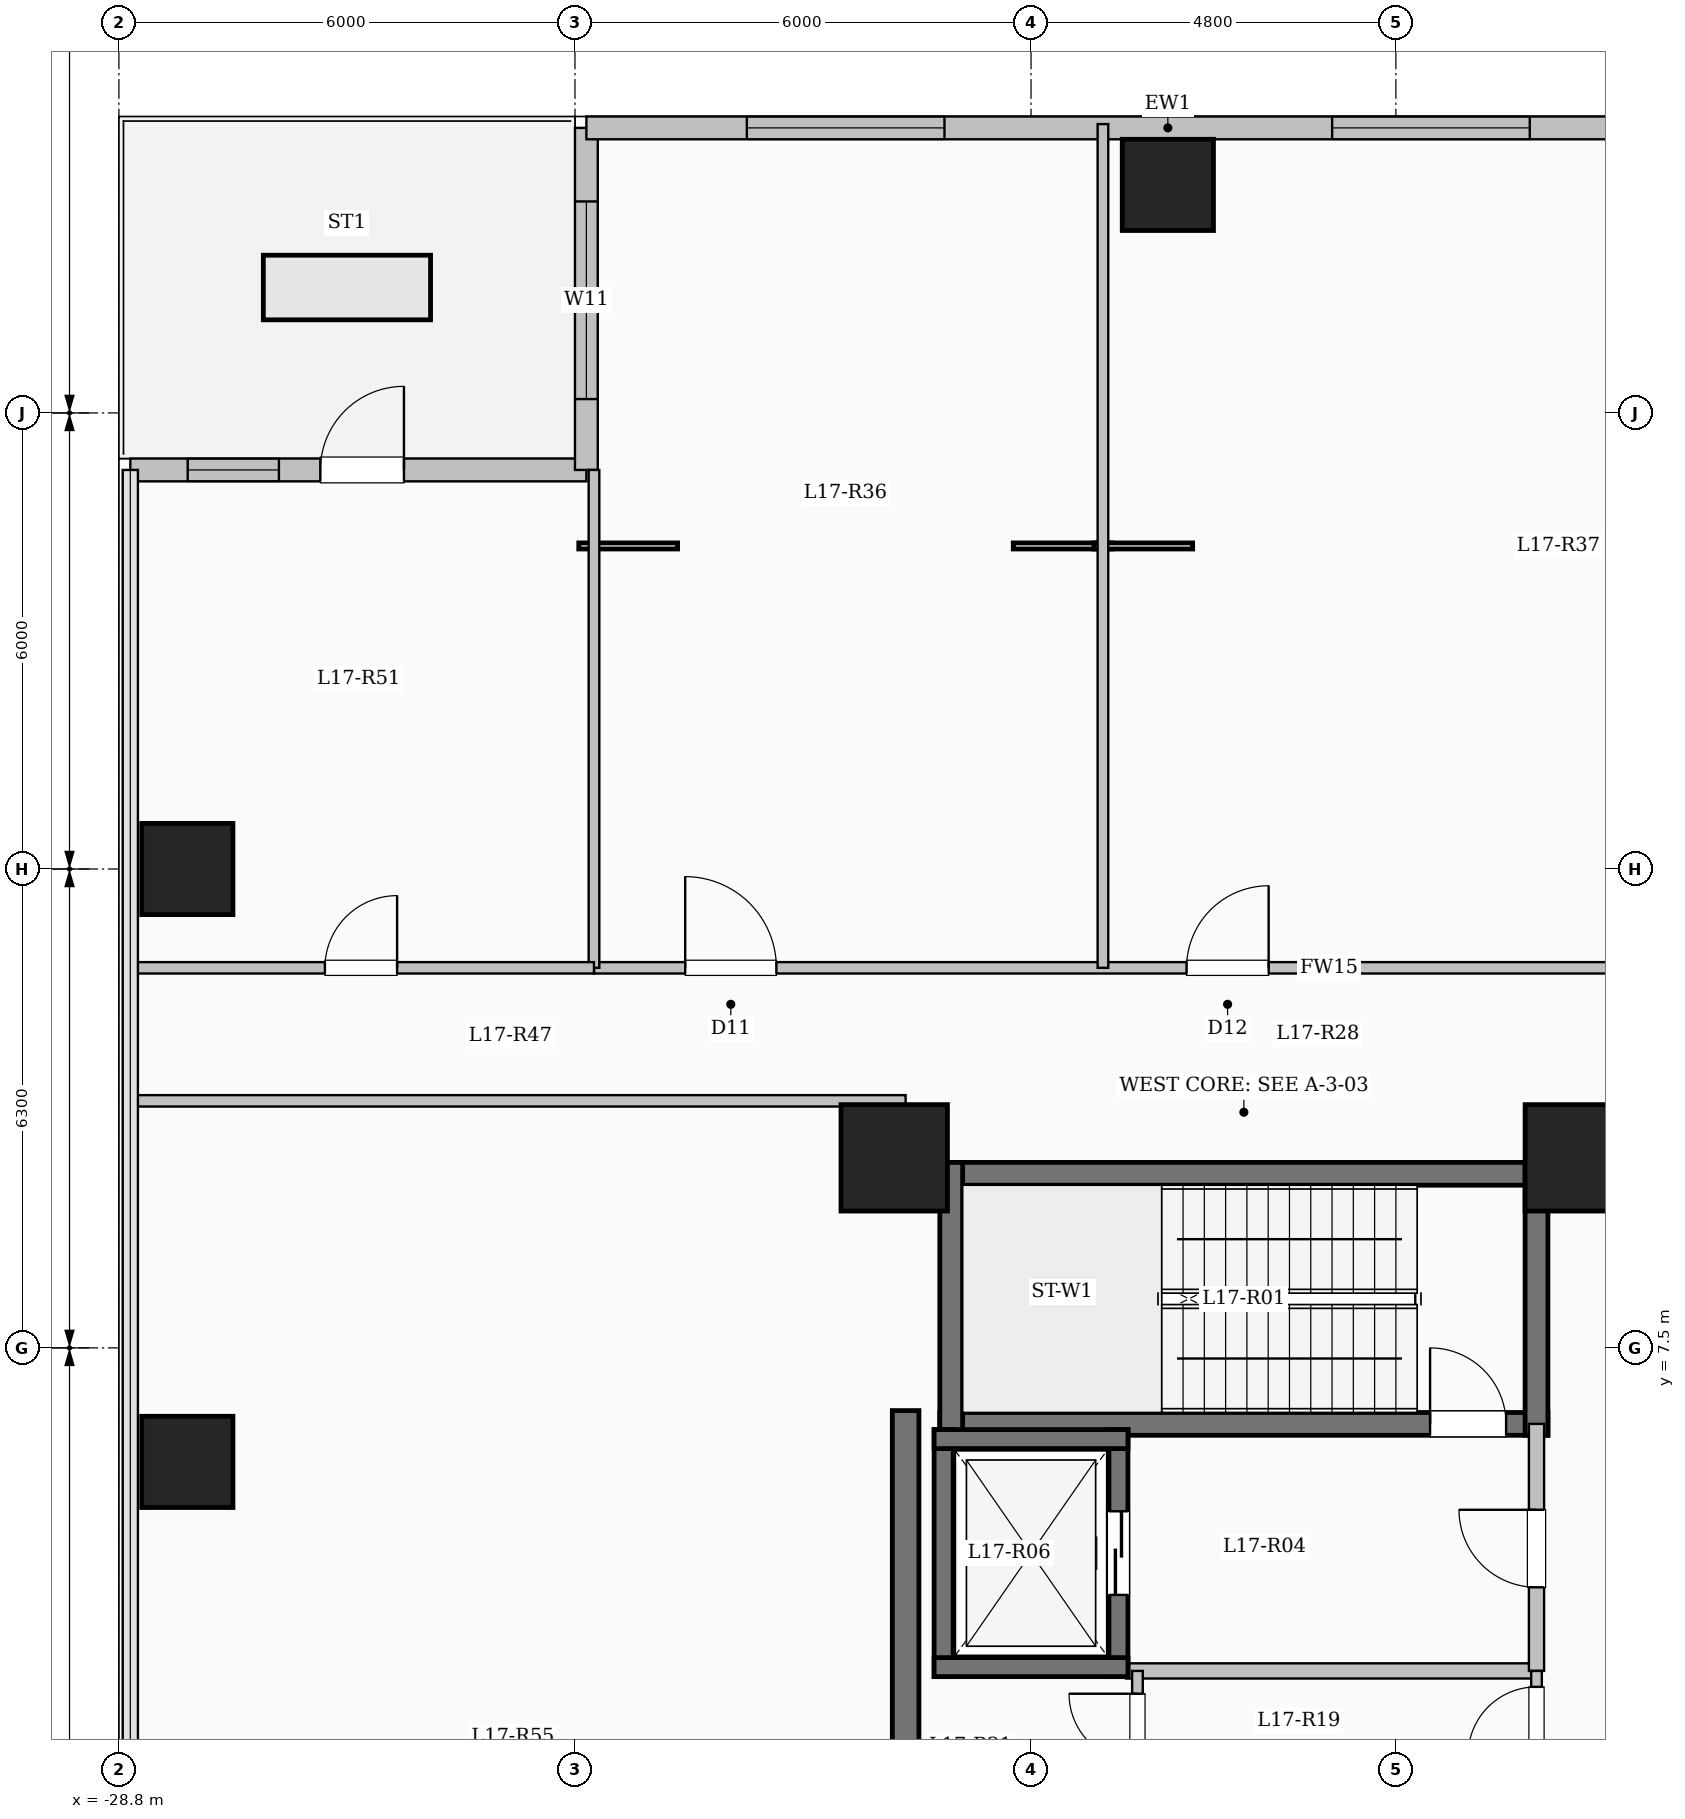
"""IFC4 building model, lengths in metres.
Left out: names, types, materials, properties, quantities, classifications, styles, units other than length and angle.
Written with IfcOpenShell. Run it as: python <this file> out.ifc"""

import sys

from ifc_helpers import new_model, si_unit, direction, frame, frame_2d, origin, origin_2d, place, context, subcontext, project, spatial, rectangle, extrude, element, fill, save


model = new_model("IFC4")
c1 = context("Model", 3, precision=1e-05, world=origin(), true_north=direction((0.0, 1.0)))
c2 = subcontext(c1, "Body", "Model", "MODEL_VIEW")
j1 = project(units=[si_unit("LENGTHUNIT", "METRE"), si_unit("PLANEANGLEUNIT", "RADIAN")], contexts=[c1])
p1 = place(None, origin())
s1 = spatial("IfcSite", under=j1, at=p1, CompositionType="ELEMENT")
p2 = place(p1, origin())
s2 = spatial("IfcBuilding", under=s1, at=p2, CompositionType="ELEMENT")
p3 = place(p2, frame((0.0, 0.0, 64.2)))
s3 = spatial("IfcBuildingStorey", under=s2, at=p3, CompositionType="ELEMENT", Elevation=64.2)
for number, where, z_axis, x_axis in (
    (1, (-9.6, 10.0, 0.0), (0.0, 0.0, 1.0), (1.0, 0.0, 0.0)),
    (2, (-18.6, 10.0, 0.0), (0.0, 0.0, 1.0), (1.0, 0.0, 0.0)),
):
    element("IfcColumn", number, at=place(p3, frame(where, z_axis=z_axis, x_axis=x_axis)), inside=s3, PredefinedType="COLUMN", context=c2, shape_type="SweptSolid", body=[
        extrude(rectangle(XDim=1.4, YDim=1.4, at=origin_2d()), origin(), (0.0, 0.0, 1.0), 4.5),
    ])
for number, where, z_axis, x_axis in (
    (3, (-15.0, 22.8, 0.0), (0.0, 0.0, 1.0), (1.0, 0.0, 0.0)),
    (4, (-27.9, 6.0, 0.0), (0.0, 0.0, 1.0), (1.0, 0.0, 0.0)),
    (5, (-27.9, 13.8, 0.0), (0.0, 0.0, 1.0), (1.0, 0.0, 0.0)),
):
    element("IfcColumn", number, at=place(p3, frame(where, z_axis=z_axis, x_axis=x_axis)), inside=s3, PredefinedType="COLUMN", context=c2, shape_type="SweptSolid", body=[
        extrude(rectangle(XDim=1.2, YDim=1.2, at=origin_2d()), origin(), (0.0, 0.0, 1.0), 4.5),
    ])
p4 = place(p3, frame((-28.65, 19.05, 0.0), z_axis=(0.0, 0.0, 1.0), x_axis=(1.0, 0.0, 0.0)))
e6 = element("IfcWall", 6, at=p4, inside=s3, PredefinedType="SOLIDWALL", context=c2, shape_type="SweptSolid", body=[
    extrude(rectangle(XDim=6.0, YDim=0.3, at=frame_2d((3.0, 0.0))), origin(), (0.0, 0.0, 1.0), 4.2),
])
p5 = place(p4, frame((2.5, 0.0, 0.0)))
e7 = element("IfcOpeningElement", 7, at=p5, cuts=e6, PredefinedType="OPENING", context=c2, shape_type="SweptSolid", body=[
    extrude(rectangle(XDim=1.1, YDim=2.2, at=frame_2d((0.55, 1.1))), frame((0.0, 0.16, 0.0), z_axis=(0.0, -1.0, 0.0), x_axis=(1.0, 0.0, 0.0)), (0.0, 0.0, 1.0), 0.32),
])
p6 = place(p4, frame((0.755, 0.0, 0.95)))
e8 = element("IfcOpeningElement", 8, at=p6, cuts=e6, PredefinedType="OPENING", context=c2, shape_type="SweptSolid", body=[
    extrude(rectangle(XDim=1.2, YDim=1.5, at=frame_2d((0.6, 0.75))), frame((0.0, 0.16, 0.0), z_axis=(0.0, -1.0, 0.0), x_axis=(1.0, 0.0, 0.0)), (0.0, 0.0, 1.0), 0.32),
])
p7 = place(p3, frame((-22.65, 19.05, 0.0), z_axis=(0.0, 0.0, 1.0), x_axis=(0.0, 1.0, 0.0)))
e9 = element("IfcWall", 9, at=p7, inside=s3, PredefinedType="SOLIDWALL", context=c2, shape_type="SweptSolid", body=[
    extrude(rectangle(XDim=4.5, YDim=0.3, at=frame_2d((2.25, 0.0))), origin(), (0.0, 0.0, 1.0), 4.2),
])
p8 = place(p7, frame((0.933, 0.0, 0.85)))
e10 = element("IfcOpeningElement", 10, at=p8, cuts=e9, PredefinedType="OPENING", context=c2, shape_type="SweptSolid", body=[
    extrude(rectangle(XDim=2.6, YDim=2.4, at=frame_2d((1.3, 1.2))), frame((0.0, 0.16, 0.0), z_axis=(0.0, -1.0, 0.0), x_axis=(1.0, 0.0, 0.0)), (0.0, 0.0, 1.0), 0.32),
])
p9 = place(p3, frame((-22.65, 23.55, 0.0), z_axis=(0.0, 0.0, 1.0), x_axis=(1.0, 0.0, 0.0)))
e11 = element("IfcWall", 11, at=p9, inside=s3, PredefinedType="SOLIDWALL", context=c2, shape_type="SweptSolid", body=[
    extrude(rectangle(XDim=15.3, YDim=0.3, at=frame_2d((7.65, 0.0))), origin(), (0.0, 0.0, 1.0), 4.2),
])
p10 = place(p9, frame((2.111, 0.0, 0.85)))
e12 = element("IfcOpeningElement", 12, at=p10, cuts=e11, PredefinedType="OPENING", context=c2, shape_type="SweptSolid", body=[
    extrude(rectangle(XDim=2.6, YDim=2.4, at=frame_2d((1.3, 1.2))), frame((0.0, 0.16, 0.0), z_axis=(0.0, -1.0, 0.0), x_axis=(1.0, 0.0, 0.0)), (0.0, 0.0, 1.0), 0.32),
])
p11 = place(p9, frame((9.811, 0.0, 0.85)))
e13 = element("IfcOpeningElement", 13, at=p11, cuts=e11, PredefinedType="OPENING", context=c2, shape_type="SweptSolid", body=[
    extrude(rectangle(XDim=2.6, YDim=2.4, at=frame_2d((1.3, 1.2))), frame((0.0, 0.16, 0.0), z_axis=(0.0, -1.0, 0.0), x_axis=(1.0, 0.0, 0.0)), (0.0, 0.0, 1.0), 0.32),
])
p12 = place(p3, frame((-18.0, 9.79, 0.0), z_axis=(0.0, 0.0, 1.0), x_axis=(1.0, 0.0, 0.0)))
e14 = element("IfcWall", 14, at=p12, inside=s3, PredefinedType="SHEAR", context=c2, shape_type="SweptSolid", body=[
    extrude(rectangle(XDim=8.0, YDim=0.3, at=frame_2d((4.0, 0.0))), origin(), (0.0, 0.0, 1.0), 4.5),
])
p13 = place(p3, frame((-18.0, 6.5, 0.0), z_axis=(0.0, 0.0, 1.0), x_axis=(1.0, 0.0, 0.0)))
e15 = element("IfcWall", 15, at=p13, inside=s3, PredefinedType="SHEAR", context=c2, shape_type="SweptSolid", body=[
    extrude(rectangle(XDim=8.0, YDim=0.3, at=frame_2d((4.0, 0.0))), origin(), (0.0, 0.0, 1.0), 4.5),
])
p14 = place(p13, frame((6.45, 0.0, 0.0)))
e16 = element("IfcOpeningElement", 16, at=p14, cuts=e15, PredefinedType="OPENING", context=c2, shape_type="SweptSolid", body=[
    extrude(rectangle(XDim=1.0, YDim=2.15, at=frame_2d((0.5, 1.075))), frame((0.0, 0.16, 0.0), z_axis=(0.0, -1.0, 0.0), x_axis=(1.0, 0.0, 0.0)), (0.0, 0.0, 1.0), 0.32),
])
for number, where, z_axis, x_axis in (
    (17, (-17.85, 6.35, 0.0), (0.0, 0.0, 1.0), (0.0, 1.0, 0.0)),
    (18, (-10.15, 6.35, 0.0), (0.0, 0.0, 1.0), (0.0, 1.0, 0.0)),
):
    element("IfcWall", number, at=place(p3, frame(where, z_axis=z_axis, x_axis=x_axis)), inside=s3, PredefinedType="SHEAR", context=c2, shape_type="SweptSolid", body=[
        extrude(rectangle(XDim=3.59, YDim=0.3, at=frame_2d((1.795, 0.0))), origin(), (0.0, 0.0, 1.0), 4.5),
    ])
p15 = place(p3, frame((-15.55, 3.25, 0.0), z_axis=(0.0, 0.0, 1.0), x_axis=(1.0, 0.0, 0.0)))
e19 = element("IfcWall", 19, at=p15, inside=s3, PredefinedType="SOLIDWALL", context=c2, shape_type="SweptSolid", body=[
    extrude(rectangle(XDim=5.4, YDim=0.2, at=frame_2d((2.7, 0.0))), origin(), (0.0, 0.0, 1.0), 4.2),
])
p16 = place(p3, frame((-10.15, 3.25, 0.0), z_axis=(0.0, 0.0, 1.0), x_axis=(0.0, 1.0, 0.0)))
e20 = element("IfcWall", 20, at=p16, inside=s3, PredefinedType="SOLIDWALL", context=c2, shape_type="SweptSolid", body=[
    extrude(rectangle(XDim=3.25, YDim=0.2, at=frame_2d((1.625, 0.0))), origin(), (0.0, 0.0, 1.0), 4.2),
])
p17 = place(p16, frame((1.1, 0.0, 0.0)))
e21 = element("IfcOpeningElement", 21, at=p17, cuts=e20, PredefinedType="OPENING", context=c2, shape_type="SweptSolid", body=[
    extrude(rectangle(XDim=1.02, YDim=2.15, at=frame_2d((0.51, 1.075))), frame((0.0, 0.11, 0.0), z_axis=(0.0, -1.0, 0.0), x_axis=(1.0, 0.0, 0.0)), (0.0, 0.0, 1.0), 0.22),
])
p18 = place(p3, frame((-17.95, 3.175, 0.0), z_axis=(0.0, 0.0, 1.0), x_axis=(0.0, 1.0, 0.0)))
e22 = element("IfcWall", 22, at=p18, inside=s3, PredefinedType="SHEAR", context=c2, shape_type="SweptSolid", body=[
    extrude(rectangle(XDim=3.25, YDim=0.25, at=frame_2d((1.625, 0.0))), origin(), (0.0, 0.0, 1.0), 4.5),
])
p19 = place(p3, frame((-15.65, 3.175, 0.0), z_axis=(0.0, 0.0, 1.0), x_axis=(0.0, 1.0, 0.0)))
e23 = element("IfcWall", 23, at=p19, inside=s3, PredefinedType="SHEAR", context=c2, shape_type="SweptSolid", body=[
    extrude(rectangle(XDim=3.25, YDim=0.25, at=frame_2d((1.625, 0.0))), origin(), (0.0, 0.0, 1.0), 4.5),
])
p20 = place(p19, frame((1.075, 0.0, 0.0)))
e24 = element("IfcOpeningElement", 24, at=p20, cuts=e23, PredefinedType="OPENING", context=c2, shape_type="SweptSolid", body=[
    extrude(rectangle(XDim=1.1, YDim=2.15, at=frame_2d((0.55, 1.075))), frame((0.0, 0.135, 0.0), z_axis=(0.0, -1.0, 0.0), x_axis=(1.0, 0.0, 0.0)), (0.0, 0.0, 1.0), 0.27),
])
for number, where, z_axis, x_axis in (
    (25, (-18.075, 3.3, 0.0), (0.0, 0.0, 1.0), (1.0, 0.0, 0.0)),
    (26, (-18.075, 6.3, 0.0), (0.0, 0.0, 1.0), (1.0, 0.0, 0.0)),
):
    element("IfcWall", number, at=place(p3, frame(where, z_axis=z_axis, x_axis=x_axis)), inside=s3, PredefinedType="SHEAR", context=c2, shape_type="SweptSolid", body=[
        extrude(rectangle(XDim=2.55, YDim=0.25, at=frame_2d((1.275, 0.0))), origin(), (0.0, 0.0, 1.0), 4.5),
    ])
p21 = place(p3, frame((-18.45, -7.375, 0.0), z_axis=(0.0, 0.0, 1.0), x_axis=(0.0, 1.0, 0.0)))
e27 = element("IfcWall", 27, at=p21, inside=s3, PredefinedType="SHEAR", context=c2, shape_type="SweptSolid", body=[
    extrude(rectangle(XDim=14.05, YDim=0.35, at=frame_2d((7.025, 0.0))), origin(), (0.0, 0.0, 1.0), 4.5),
])
p22 = place(p3, frame((-10.15, 1.92, 0.0), z_axis=(0.0, 0.0, 1.0), x_axis=(0.0, 1.0, 0.0)))
e28 = element("IfcWall", 28, at=p22, inside=s3, PredefinedType="PARTITIONING", context=c2, shape_type="SweptSolid", body=[
    extrude(rectangle(XDim=1.33, YDim=0.14, at=frame_2d((0.665, 0.0))), origin(), (0.0, 0.0, 1.0), 4.2),
])
p23 = place(p22, frame((0.22, 0.0, 0.0)))
e29 = element("IfcOpeningElement", 29, at=p23, cuts=e28, PredefinedType="OPENING", context=c2, shape_type="SweptSolid", body=[
    extrude(rectangle(XDim=0.9, YDim=2.08, at=frame_2d((0.45, 1.04))), frame((0.0, 0.08, 0.0), z_axis=(0.0, -1.0, 0.0), x_axis=(1.0, 0.0, 0.0)), (0.0, 0.0, 1.0), 0.16),
])
p24 = place(p3, frame((-15.4, -7.2, 0.0), z_axis=(0.0, 0.0, 1.0), x_axis=(0.0, 1.0, 0.0)))
e30 = element("IfcWall", 30, at=p24, inside=s3, PredefinedType="PARTITIONING", context=c2, shape_type="SweptSolid", body=[
    extrude(rectangle(XDim=10.45, YDim=0.14, at=frame_2d((5.225, 0.0))), origin(), (0.0, 0.0, 1.0), 4.2),
])
p25 = place(p24, frame((9.25, 0.0, 0.0)))
e31 = element("IfcOpeningElement", 31, at=p25, cuts=e30, PredefinedType="OPENING", context=c2, shape_type="SweptSolid", body=[
    extrude(rectangle(XDim=0.9, YDim=2.08, at=frame_2d((0.45, 1.04))), frame((0.0, 0.08, 0.0), z_axis=(0.0, -1.0, 0.0), x_axis=(1.0, 0.0, 0.0)), (0.0, 0.0, 1.0), 0.16),
])
p26 = place(p3, frame((-22.55, 12.5, 0.0), z_axis=(0.0, 0.0, 1.0), x_axis=(1.0, 0.0, 0.0)))
e32 = element("IfcWall", 32, at=p26, inside=s3, PredefinedType="PARTITIONING", context=c2, shape_type="SweptSolid", body=[
    extrude(rectangle(XDim=18.7, YDim=0.15, at=frame_2d((9.35, 0.0))), origin(), (0.0, 0.0, 1.0), 4.2),
])
p27 = place(p26, frame((1.2, 0.0, 0.0)))
e33 = element("IfcOpeningElement", 33, at=p27, cuts=e32, PredefinedType="OPENING", context=c2, shape_type="SweptSolid", body=[
    extrude(rectangle(XDim=1.2, YDim=2.15, at=frame_2d((0.6, 1.075))), frame((0.0, 0.085, 0.0), z_axis=(0.0, -1.0, 0.0), x_axis=(1.0, 0.0, 0.0)), (0.0, 0.0, 1.0), 0.17),
])
p28 = place(p26, frame((7.796, 0.0, 0.0)))
e34 = element("IfcOpeningElement", 34, at=p28, cuts=e32, PredefinedType="OPENING", context=c2, shape_type="SweptSolid", body=[
    extrude(rectangle(XDim=1.08, YDim=2.15, at=frame_2d((0.54, 1.075))), frame((0.0, 0.085, 0.0), z_axis=(0.0, -1.0, 0.0), x_axis=(1.0, 0.0, 0.0)), (0.0, 0.0, 1.0), 0.17),
])
p29 = place(p3, frame((-15.854, 12.5, 0.0), z_axis=(0.0, 0.0, 1.0), x_axis=(0.0, 1.0, 0.0)))
e35 = element("IfcWall", 35, at=p29, inside=s3, PredefinedType="PARTITIONING", context=c2, shape_type="SweptSolid", body=[
    extrude(rectangle(XDim=11.1, YDim=0.14, at=frame_2d((5.55, 0.0))), origin(), (0.0, 0.0, 1.0), 4.2),
])
p30 = place(p3, frame((-28.68, 10.75, 0.0), z_axis=(0.0, 0.0, 1.0), x_axis=(1.0, 0.0, 0.0)))
e36 = element("IfcWall", 36, at=p30, inside=s3, PredefinedType="PARTITIONING", context=c2, shape_type="SweptSolid", body=[
    extrude(rectangle(XDim=10.23, YDim=0.15, at=frame_2d((5.115, 0.0))), origin(), (0.0, 0.0, 1.0), 4.2),
])
p31 = place(p3, frame((-22.55, 12.5, 0.0), z_axis=(0.0, 0.0, 1.0), x_axis=(0.0, 1.0, 0.0)))
e37 = element("IfcWall", 37, at=p31, inside=s3, PredefinedType="PARTITIONING", context=c2, shape_type="SweptSolid", body=[
    extrude(rectangle(XDim=6.55, YDim=0.14, at=frame_2d((3.275, 0.0))), origin(), (0.0, 0.0, 1.0), 4.2),
])
p32 = place(p3, frame((-28.68, 12.5, 0.0), z_axis=(0.0, 0.0, 1.0), x_axis=(1.0, 0.0, 0.0)))
e38 = element("IfcWall", 38, at=p32, inside=s3, PredefinedType="PARTITIONING", context=c2, shape_type="SweptSolid", body=[
    extrude(rectangle(XDim=6.13, YDim=0.15, at=frame_2d((3.065, 0.0))), origin(), (0.0, 0.0, 1.0), 4.2),
])
p33 = place(p32, frame((2.59, 0.0, 0.0)))
e39 = element("IfcOpeningElement", 39, at=p33, cuts=e38, PredefinedType="OPENING", context=c2, shape_type="SweptSolid", body=[
    extrude(rectangle(XDim=0.95, YDim=2.15, at=frame_2d((0.475, 1.075))), frame((0.0, 0.085, 0.0), z_axis=(0.0, -1.0, 0.0), x_axis=(1.0, 0.0, 0.0)), (0.0, 0.0, 1.0), 0.17),
])
p34 = place(p5, origin())
e40 = element("IfcDoor", 40, at=p34, inside=s3, OperationType="SINGLE_SWING_RIGHT", PredefinedType="DOOR", context=c2, shape_type="SweptSolid", body=[
    extrude(rectangle(XDim=1.1, YDim=2.2, at=frame_2d((0.55, 1.1))), frame((0.0, 0.025, 0.0), z_axis=(0.0, -1.0, 0.0), x_axis=(1.0, 0.0, 0.0)), (0.0, 0.0, 1.0), 0.05),
])
fill(e7, e40)
p35 = place(p6, origin())
e41 = element("IfcWindow", 41, at=p35, inside=s3, PartitioningType="SINGLE_PANEL", PredefinedType="WINDOW", context=c2, shape_type="SweptSolid", body=[
    extrude(rectangle(XDim=1.2, YDim=1.5, at=frame_2d((0.6, 0.75))), frame((0.0, 0.03, 0.0), z_axis=(0.0, -1.0, 0.0), x_axis=(1.0, 0.0, 0.0)), (0.0, 0.0, 1.0), 0.06),
])
fill(e8, e41)
p36 = place(p8, origin())
e42 = element("IfcWindow", 42, at=p36, inside=s3, PartitioningType="SINGLE_PANEL", PredefinedType="WINDOW", context=c2, shape_type="SweptSolid", body=[
    extrude(rectangle(XDim=2.6, YDim=2.4, at=frame_2d((1.3, 1.2))), frame((0.0, 0.03, 0.0), z_axis=(0.0, -1.0, 0.0), x_axis=(1.0, 0.0, 0.0)), (0.0, 0.0, 1.0), 0.06),
])
fill(e10, e42)
p37 = place(p10, origin())
e43 = element("IfcWindow", 43, at=p37, inside=s3, PartitioningType="SINGLE_PANEL", PredefinedType="WINDOW", context=c2, shape_type="SweptSolid", body=[
    extrude(rectangle(XDim=2.6, YDim=2.4, at=frame_2d((1.3, 1.2))), frame((0.0, 0.03, 0.0), z_axis=(0.0, -1.0, 0.0), x_axis=(1.0, 0.0, 0.0)), (0.0, 0.0, 1.0), 0.06),
])
fill(e12, e43)
p38 = place(p11, origin())
e44 = element("IfcWindow", 44, at=p38, inside=s3, PartitioningType="SINGLE_PANEL", PredefinedType="WINDOW", context=c2, shape_type="SweptSolid", body=[
    extrude(rectangle(XDim=2.6, YDim=2.4, at=frame_2d((1.3, 1.2))), frame((0.0, 0.03, 0.0), z_axis=(0.0, -1.0, 0.0), x_axis=(1.0, 0.0, 0.0)), (0.0, 0.0, 1.0), 0.06),
])
fill(e13, e44)
p39 = place(p14, origin())
e45 = element("IfcDoor", 45, at=p39, inside=s3, OperationType="SINGLE_SWING_LEFT", PredefinedType="DOOR", context=c2, shape_type="SweptSolid", body=[
    extrude(rectangle(XDim=1.0, YDim=2.15, at=frame_2d((0.5, 1.075))), frame((0.0, 0.025, 0.0), z_axis=(0.0, -1.0, 0.0), x_axis=(1.0, 0.0, 0.0)), (0.0, 0.0, 1.0), 0.05),
])
fill(e16, e45)
p40 = place(p17, origin())
e46 = element("IfcDoor", 46, at=p40, inside=s3, OperationType="SINGLE_SWING_RIGHT", PredefinedType="DOOR", context=c2, shape_type="SweptSolid", body=[
    extrude(rectangle(XDim=1.02, YDim=2.15, at=frame_2d((0.51, 1.075))), frame((0.0, 0.025, 0.0), z_axis=(0.0, -1.0, 0.0), x_axis=(1.0, 0.0, 0.0)), (0.0, 0.0, 1.0), 0.05),
])
fill(e21, e46)
p41 = place(p20, origin())
e47 = element("IfcDoor", 47, at=p41, inside=s3, OperationType="SLIDING_TO_LEFT", PredefinedType="DOOR", context=c2, shape_type="SweptSolid", body=[
    extrude(rectangle(XDim=1.1, YDim=2.15, at=frame_2d((0.55, 1.075))), frame((0.0, 0.025, 0.0), z_axis=(0.0, -1.0, 0.0), x_axis=(1.0, 0.0, 0.0)), (0.0, 0.0, 1.0), 0.05),
])
fill(e24, e47)
p42 = place(p23, origin())
e48 = element("IfcDoor", 48, at=p42, inside=s3, OperationType="SINGLE_SWING_LEFT", PredefinedType="DOOR", context=c2, shape_type="SweptSolid", body=[
    extrude(rectangle(XDim=0.9, YDim=2.08, at=frame_2d((0.45, 1.04))), frame((0.0, 0.025, 0.0), z_axis=(0.0, -1.0, 0.0), x_axis=(1.0, 0.0, 0.0)), (0.0, 0.0, 1.0), 0.05),
])
fill(e29, e48)
p43 = place(p25, origin())
e49 = element("IfcDoor", 49, at=p43, inside=s3, OperationType="SINGLE_SWING_RIGHT", PredefinedType="DOOR", context=c2, shape_type="SweptSolid", body=[
    extrude(rectangle(XDim=0.9, YDim=2.08, at=frame_2d((0.45, 1.04))), frame((0.0, 0.025, 0.0), z_axis=(0.0, -1.0, 0.0), x_axis=(1.0, 0.0, 0.0)), (0.0, 0.0, 1.0), 0.05),
])
fill(e31, e49)
p44 = place(p27, origin())
e50 = element("IfcDoor", 50, at=p44, inside=s3, OperationType="SINGLE_SWING_LEFT", PredefinedType="DOOR", context=c2, shape_type="SweptSolid", body=[
    extrude(rectangle(XDim=1.2, YDim=2.15, at=frame_2d((0.6, 1.075))), frame((0.0, 0.025, 0.0), z_axis=(0.0, -1.0, 0.0), x_axis=(1.0, 0.0, 0.0)), (0.0, 0.0, 1.0), 0.05),
])
fill(e33, e50)
p45 = place(p28, origin())
e51 = element("IfcDoor", 51, at=p45, inside=s3, OperationType="SINGLE_SWING_RIGHT", PredefinedType="DOOR", context=c2, shape_type="SweptSolid", body=[
    extrude(rectangle(XDim=1.08, YDim=2.15, at=frame_2d((0.54, 1.075))), frame((0.0, 0.025, 0.0), z_axis=(0.0, -1.0, 0.0), x_axis=(1.0, 0.0, 0.0)), (0.0, 0.0, 1.0), 0.05),
])
fill(e34, e51)
p46 = place(p33, origin())
e52 = element("IfcDoor", 52, at=p46, inside=s3, OperationType="SINGLE_SWING_RIGHT", PredefinedType="DOOR", context=c2, shape_type="SweptSolid", body=[
    extrude(rectangle(XDim=0.95, YDim=2.15, at=frame_2d((0.475, 1.075))), frame((0.0, 0.025, 0.0), z_axis=(0.0, -1.0, 0.0), x_axis=(1.0, 0.0, 0.0)), (0.0, 0.0, 1.0), 0.05),
])
fill(e39, e52)
save(model, sys.argv[1])
